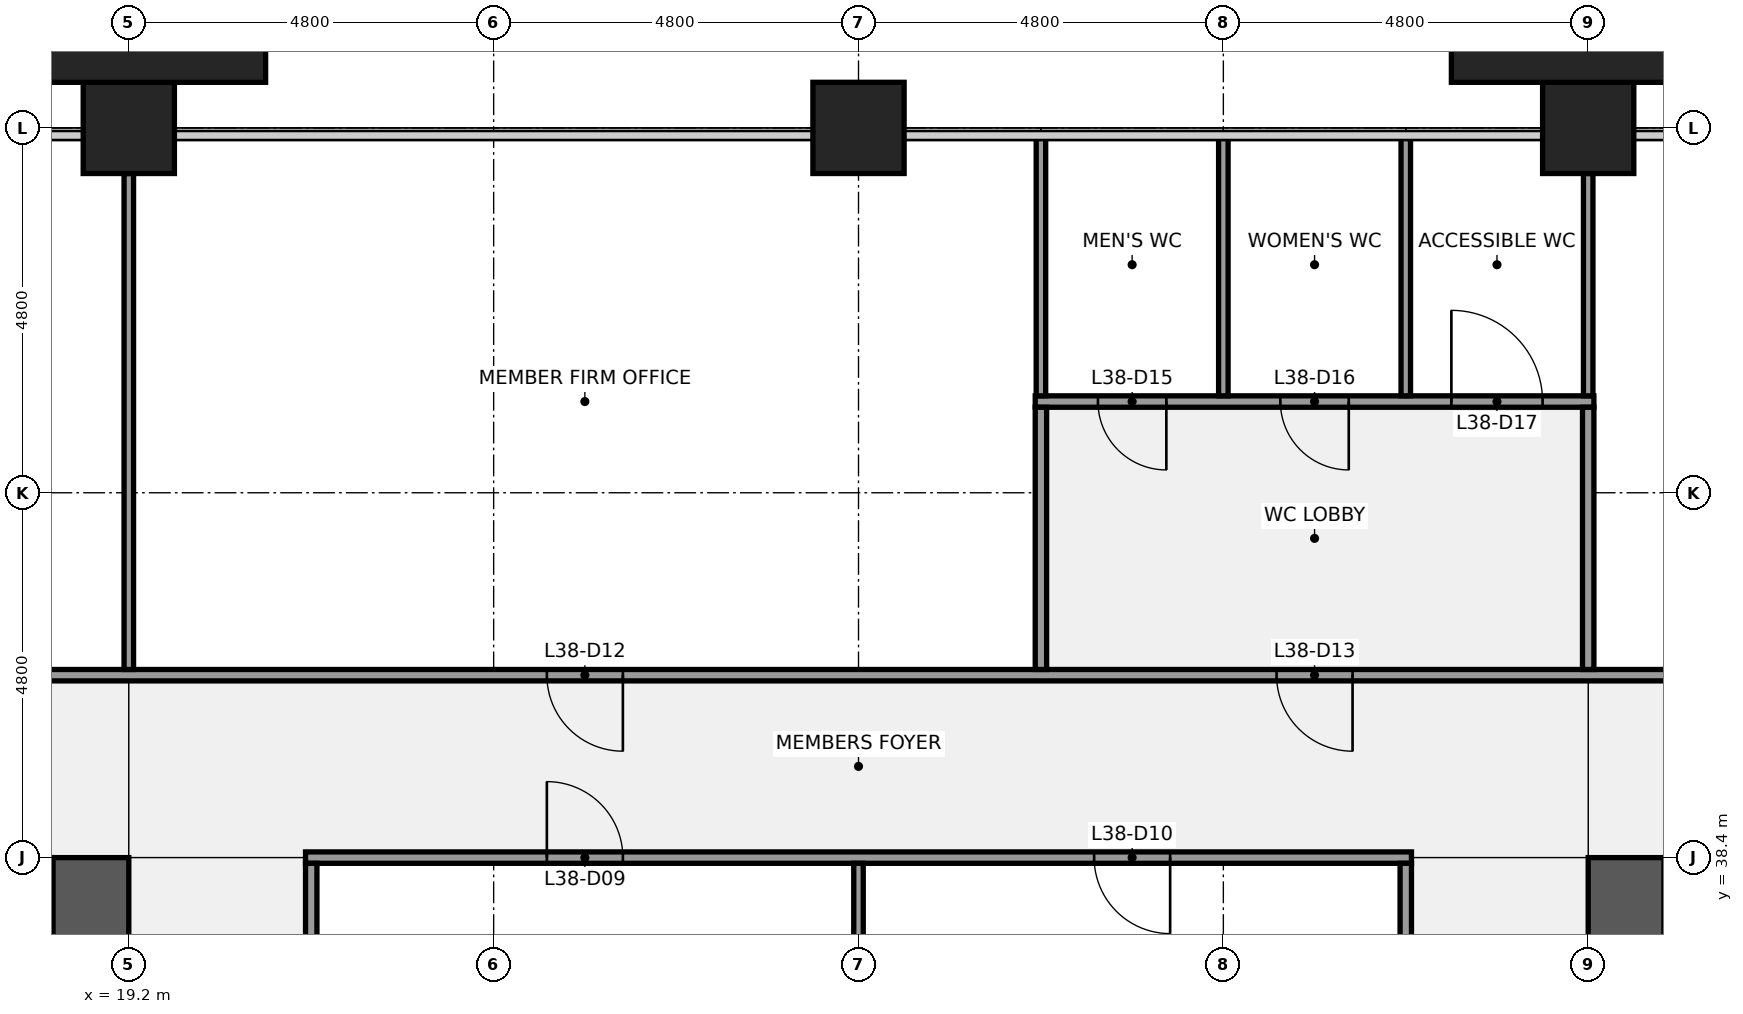
"""IFC4 building model, lengths in metres.
Left out: names, types, materials, properties, quantities, classifications, styles, units other than length and angle.
Written with IfcOpenShell. Run it as: python <this file> out.ifc"""

import sys

from ifc_helpers import new_model, si_unit, direction, frame, frame_2d, origin, origin_2d, place, context, subcontext, project, spatial, rectangle, extrude, element, fill, save


model = new_model("IFC4")
c1 = context("Model", 3, precision=1e-05, world=origin(), true_north=direction((0.0, 1.0)))
c2 = subcontext(c1, "Body", "Model", "MODEL_VIEW")
j1 = project(units=[si_unit("LENGTHUNIT", "METRE"), si_unit("PLANEANGLEUNIT", "RADIAN")], contexts=[c1])
p1 = place(None, origin())
s1 = spatial("IfcSite", under=j1, at=p1, CompositionType="ELEMENT")
p2 = place(p1, origin())
s2 = spatial("IfcBuilding", under=s1, at=p2, CompositionType="ELEMENT")
p3 = place(p2, frame((0.0, 0.0, 172.1)))
s3 = spatial("IfcBuildingStorey", under=s2, at=p3, CompositionType="ELEMENT", Elevation=172.1)
for number, where, z_axis, x_axis in (
    (1, (19.2, 48.0, 0.0), (0.0, 0.0, 1.0), (1.0, 0.0, 0.0)),
    (2, (28.8, 48.0, 0.0), (0.0, 0.0, 1.0), (1.0, 0.0, 0.0)),
    (3, (38.4, 48.0, 0.0), (0.0, 0.0, 1.0), (1.0, 0.0, 0.0)),
):
    element("IfcColumn", number, at=place(p3, frame(where, z_axis=z_axis, x_axis=x_axis)), inside=s3, PredefinedType="COLUMN", context=c2, shape_type="SweptSolid", body=[
        extrude(rectangle(XDim=1.2, YDim=1.2, at=origin_2d()), origin(), (0.0, 0.0, 1.0), 4.0),
    ])
p4 = place(p3, frame((18.7, 38.4, 0.0), z_axis=(0.0, 0.0, 1.0), x_axis=(0.0, -1.0, 0.0)))
e4 = element("IfcWall", 4, at=p4, inside=s3, PredefinedType="SHEAR", context=c2, shape_type="SweptSolid", body=[
    extrude(rectangle(XDim=28.8, YDim=1.0, at=frame_2d((14.4, 0.0))), origin(), (0.0, 0.0, 1.0), 3.7),
])
p5 = place(p4, frame((18.3, 0.0, 0.0)))
e5 = element("IfcOpeningElement", 5, at=p5, cuts=e4, PredefinedType="OPENING", context=c2, shape_type="SweptSolid", body=[
    extrude(rectangle(XDim=1.8, YDim=2.1, at=frame_2d((0.9, 1.05))), frame((0.0, 0.51, 0.0), z_axis=(0.0, -1.0, 0.0), x_axis=(1.0, 0.0, 0.0)), (0.0, 0.0, 1.0), 1.02),
])
p6 = place(p4, frame((8.7, 0.0, 0.0)))
e6 = element("IfcOpeningElement", 6, at=p6, cuts=e4, PredefinedType="OPENING", context=c2, shape_type="SweptSolid", body=[
    extrude(rectangle(XDim=1.8, YDim=2.1, at=frame_2d((0.9, 1.05))), frame((0.0, 0.51, 0.0), z_axis=(0.0, -1.0, 0.0), x_axis=(1.0, 0.0, 0.0)), (0.0, 0.0, 1.0), 1.02),
])
p7 = place(p3, frame((38.9, 9.6, 0.0), z_axis=(0.0, 0.0, 1.0), x_axis=(0.0, 1.0, 0.0)))
e7 = element("IfcWall", 7, at=p7, inside=s3, PredefinedType="SHEAR", context=c2, shape_type="SweptSolid", body=[
    extrude(rectangle(XDim=28.8, YDim=1.0, at=frame_2d((14.4, 0.0))), origin(), (0.0, 0.0, 1.0), 3.7),
])
p8 = place(p7, frame((8.7, 0.0, 0.0)))
e8 = element("IfcOpeningElement", 8, at=p8, cuts=e7, PredefinedType="OPENING", context=c2, shape_type="SweptSolid", body=[
    extrude(rectangle(XDim=1.8, YDim=2.1, at=frame_2d((0.9, 1.05))), frame((0.0, 0.51, 0.0), z_axis=(0.0, -1.0, 0.0), x_axis=(1.0, 0.0, 0.0)), (0.0, 0.0, 1.0), 1.02),
])
p9 = place(p7, frame((18.3, 0.0, 0.0)))
e9 = element("IfcOpeningElement", 9, at=p9, cuts=e7, PredefinedType="OPENING", context=c2, shape_type="SweptSolid", body=[
    extrude(rectangle(XDim=1.8, YDim=2.1, at=frame_2d((0.9, 1.05))), frame((0.0, 0.51, 0.0), z_axis=(0.0, -1.0, 0.0), x_axis=(1.0, 0.0, 0.0)), (0.0, 0.0, 1.0), 1.02),
])
p10 = place(p3, frame((21.525, 38.4, 0.0), z_axis=(0.0, 0.0, 1.0), x_axis=(1.0, 0.0, 0.0)))
e10 = element("IfcWall", 10, at=p10, inside=s3, PredefinedType="PARTITIONING", context=c2, shape_type="SweptSolid", body=[
    extrude(rectangle(XDim=14.55, YDim=0.15, at=frame_2d((7.275, 0.0))), origin(), (0.0, 0.0, 1.0), 2.709),
])
p11 = place(p10, frame((3.175, 0.0, 0.0)))
e11 = element("IfcOpeningElement", 11, at=p11, cuts=e10, PredefinedType="OPENING", context=c2, shape_type="SweptSolid", body=[
    extrude(rectangle(XDim=1.0, YDim=2.1, at=frame_2d((0.5, 1.05))), frame((0.0, 0.085, 0.0), z_axis=(0.0, -1.0, 0.0), x_axis=(1.0, 0.0, 0.0)), (0.0, 0.0, 1.0), 0.17),
])
p12 = place(p10, frame((10.375, 0.0, 0.0)))
e12 = element("IfcOpeningElement", 12, at=p12, cuts=e10, PredefinedType="OPENING", context=c2, shape_type="SweptSolid", body=[
    extrude(rectangle(XDim=1.0, YDim=2.1, at=frame_2d((0.5, 1.05))), frame((0.0, 0.085, 0.0), z_axis=(0.0, -1.0, 0.0), x_axis=(1.0, 0.0, 0.0)), (0.0, 0.0, 1.0), 0.17),
])
p13 = place(p3, frame((9.7, 40.8, 0.0), z_axis=(0.0, 0.0, 1.0), x_axis=(1.0, 0.0, 0.0)))
e13 = element("IfcWall", 13, at=p13, inside=s3, PredefinedType="PARTITIONING", context=c2, shape_type="SweptSolid", body=[
    extrude(rectangle(XDim=38.2, YDim=0.15, at=frame_2d((19.1, 0.0))), origin(), (0.0, 0.0, 1.0), 2.709),
])
p14 = place(p13, frame((4.25, 0.0, 0.0)))
e14 = element("IfcOpeningElement", 14, at=p14, cuts=e13, PredefinedType="OPENING", context=c2, shape_type="SweptSolid", body=[
    extrude(rectangle(XDim=1.0, YDim=2.1, at=frame_2d((0.5, 1.05))), frame((0.0, 0.085, 0.0), z_axis=(0.0, -1.0, 0.0), x_axis=(1.0, 0.0, 0.0)), (0.0, 0.0, 1.0), 0.17),
])
p15 = place(p13, frame((15.0, 0.0, 0.0)))
e15 = element("IfcOpeningElement", 15, at=p15, cuts=e13, PredefinedType="OPENING", context=c2, shape_type="SweptSolid", body=[
    extrude(rectangle(XDim=1.0, YDim=2.1, at=frame_2d((0.5, 1.05))), frame((0.0, 0.085, 0.0), z_axis=(0.0, -1.0, 0.0), x_axis=(1.0, 0.0, 0.0)), (0.0, 0.0, 1.0), 0.17),
])
p16 = place(p13, frame((24.6, 0.0, 0.0)))
e16 = element("IfcOpeningElement", 16, at=p16, cuts=e13, PredefinedType="OPENING", context=c2, shape_type="SweptSolid", body=[
    extrude(rectangle(XDim=1.0, YDim=2.1, at=frame_2d((0.5, 1.05))), frame((0.0, 0.085, 0.0), z_axis=(0.0, -1.0, 0.0), x_axis=(1.0, 0.0, 0.0)), (0.0, 0.0, 1.0), 0.17),
])
p17 = place(p13, frame((32.95, 0.0, 0.0)))
e17 = element("IfcOpeningElement", 17, at=p17, cuts=e13, PredefinedType="OPENING", context=c2, shape_type="SweptSolid", body=[
    extrude(rectangle(XDim=1.0, YDim=2.1, at=frame_2d((0.5, 1.05))), frame((0.0, 0.085, 0.0), z_axis=(0.0, -1.0, 0.0), x_axis=(1.0, 0.0, 0.0)), (0.0, 0.0, 1.0), 0.17),
])
p18 = place(p3, frame((31.125, 44.4, 0.0), z_axis=(0.0, 0.0, 1.0), x_axis=(1.0, 0.0, 0.0)))
e18 = element("IfcWall", 18, at=p18, inside=s3, PredefinedType="PARTITIONING", context=c2, shape_type="SweptSolid", body=[
    extrude(rectangle(XDim=7.35, YDim=0.15, at=frame_2d((3.675, 0.0))), origin(), (0.0, 0.0, 1.0), 2.709),
])
p19 = place(p18, frame((0.825, 0.0, 0.0)))
e19 = element("IfcOpeningElement", 19, at=p19, cuts=e18, PredefinedType="OPENING", context=c2, shape_type="SweptSolid", body=[
    extrude(rectangle(XDim=0.9, YDim=2.1, at=frame_2d((0.45, 1.05))), frame((0.0, 0.085, 0.0), z_axis=(0.0, -1.0, 0.0), x_axis=(1.0, 0.0, 0.0)), (0.0, 0.0, 1.0), 0.17),
])
p20 = place(p18, frame((3.225, 0.0, 0.0)))
e20 = element("IfcOpeningElement", 20, at=p20, cuts=e18, PredefinedType="OPENING", context=c2, shape_type="SweptSolid", body=[
    extrude(rectangle(XDim=0.9, YDim=2.1, at=frame_2d((0.45, 1.05))), frame((0.0, 0.085, 0.0), z_axis=(0.0, -1.0, 0.0), x_axis=(1.0, 0.0, 0.0)), (0.0, 0.0, 1.0), 0.17),
])
p21 = place(p18, frame((5.475, 0.0, 0.0)))
e21 = element("IfcOpeningElement", 21, at=p21, cuts=e18, PredefinedType="OPENING", context=c2, shape_type="SweptSolid", body=[
    extrude(rectangle(XDim=1.2, YDim=2.1, at=frame_2d((0.6, 1.05))), frame((0.0, 0.085, 0.0), z_axis=(0.0, -1.0, 0.0), x_axis=(1.0, 0.0, 0.0)), (0.0, 0.0, 1.0), 0.17),
])
p22 = place(p3, frame((19.2, 40.875, 0.0), z_axis=(0.0, 0.0, 1.0), x_axis=(0.0, 1.0, 0.0)))
e22 = element("IfcWall", 22, at=p22, inside=s3, PredefinedType="PARTITIONING", context=c2, shape_type="SweptSolid", body=[
    extrude(rectangle(XDim=6.525, YDim=0.125, at=frame_2d((3.262, 0.0))), origin(), (0.0, 0.0, 1.0), 2.709),
])
p23 = place(p3, frame((21.6, 33.675, 0.0), z_axis=(0.0, 0.0, 1.0), x_axis=(0.0, 1.0, 0.0)))
e23 = element("IfcWall", 23, at=p23, inside=s3, PredefinedType="PARTITIONING", context=c2, shape_type="SweptSolid", body=[
    extrude(rectangle(XDim=4.65, YDim=0.15, at=frame_2d((2.325, 0.0))), origin(), (0.0, 0.0, 1.0), 2.709),
])
p24 = place(p3, frame((28.8, 33.663, 0.0), z_axis=(0.0, 0.0, 1.0), x_axis=(0.0, 1.0, 0.0)))
e24 = element("IfcWall", 24, at=p24, inside=s3, PredefinedType="PARTITIONING", context=c2, shape_type="SweptSolid", body=[
    extrude(rectangle(XDim=4.662, YDim=0.125, at=frame_2d((2.331, 0.0))), origin(), (0.0, 0.0, 1.0), 2.709),
])
p25 = place(p3, frame((31.2, 44.475, 0.0), z_axis=(0.0, 0.0, 1.0), x_axis=(0.0, 1.0, 0.0)))
e25 = element("IfcWall", 25, at=p25, inside=s3, PredefinedType="PARTITIONING", context=c2, shape_type="SweptSolid", body=[
    extrude(rectangle(XDim=3.425, YDim=0.125, at=frame_2d((1.712, 0.0))), origin(), (0.0, 0.0, 1.0), 2.709),
])
p26 = place(p3, frame((31.2, 40.875, 0.0), z_axis=(0.0, 0.0, 1.0), x_axis=(0.0, 1.0, 0.0)))
e26 = element("IfcWall", 26, at=p26, inside=s3, PredefinedType="PARTITIONING", context=c2, shape_type="SweptSolid", body=[
    extrude(rectangle(XDim=3.45, YDim=0.15, at=frame_2d((1.725, 0.0))), origin(), (0.0, 0.0, 1.0), 2.709),
])
for number, where, z_axis, x_axis in (
    (27, (33.6, 44.475, 0.0), (0.0, 0.0, 1.0), (0.0, 1.0, 0.0)),
    (28, (36.0, 44.475, 0.0), (0.0, 0.0, 1.0), (0.0, 1.0, 0.0)),
):
    element("IfcWall", number, at=place(p3, frame(where, z_axis=z_axis, x_axis=x_axis)), inside=s3, PredefinedType="PARTITIONING", context=c2, shape_type="SweptSolid", body=[
        extrude(rectangle(XDim=3.425, YDim=0.125, at=frame_2d((1.712, 0.0))), origin(), (0.0, 0.0, 1.0), 2.709),
    ])
p27 = place(p3, frame((36.0, 33.675, 0.0), z_axis=(0.0, 0.0, 1.0), x_axis=(0.0, 1.0, 0.0)))
e29 = element("IfcWall", 29, at=p27, inside=s3, PredefinedType="PARTITIONING", context=c2, shape_type="SweptSolid", body=[
    extrude(rectangle(XDim=4.65, YDim=0.15, at=frame_2d((2.325, 0.0))), origin(), (0.0, 0.0, 1.0), 2.709),
])
p28 = place(p3, frame((38.4, 44.475, 0.0), z_axis=(0.0, 0.0, 1.0), x_axis=(0.0, 1.0, 0.0)))
e30 = element("IfcWall", 30, at=p28, inside=s3, PredefinedType="PARTITIONING", context=c2, shape_type="SweptSolid", body=[
    extrude(rectangle(XDim=2.925, YDim=0.125, at=frame_2d((1.462, 0.0))), origin(), (0.0, 0.0, 1.0), 2.709),
])
p29 = place(p3, frame((38.4, 40.875, 0.0), z_axis=(0.0, 0.0, 1.0), x_axis=(0.0, 1.0, 0.0)))
e31 = element("IfcWall", 31, at=p29, inside=s3, PredefinedType="PARTITIONING", context=c2, shape_type="SweptSolid", body=[
    extrude(rectangle(XDim=3.45, YDim=0.15, at=frame_2d((1.725, 0.0))), origin(), (0.0, 0.0, 1.0), 2.709),
])
for number, where, z_axis, x_axis in (
    (32, (19.2, 49.05, 0.0), (0.0, 0.0, 1.0), (1.0, 0.0, 0.0)),
    (33, (38.4, 49.05, 0.0), (0.0, 0.0, 1.0), (1.0, 0.0, 0.0)),
):
    element("IfcColumn", number, at=place(p3, frame(where, z_axis=z_axis, x_axis=x_axis)), inside=s3, PredefinedType="PILASTER", context=c2, shape_type="SweptSolid", body=[
        extrude(rectangle(XDim=3.6, YDim=0.9, at=origin_2d()), origin(), (0.0, 0.0, 1.0), 4.0),
    ])
p30 = place(p11, origin())
e34 = element("IfcDoor", 34, at=p30, inside=s3, OperationType="SINGLE_SWING_LEFT", PredefinedType="DOOR", context=c2, shape_type="SweptSolid", body=[
    extrude(rectangle(XDim=1.0, YDim=2.1, at=frame_2d((0.5, 1.05))), frame((0.0, 0.025, 0.0), z_axis=(0.0, -1.0, 0.0), x_axis=(1.0, 0.0, 0.0)), (0.0, 0.0, 1.0), 0.05),
])
fill(e11, e34)
p31 = place(p12, origin())
e35 = element("IfcDoor", 35, at=p31, inside=s3, OperationType="SINGLE_SWING_RIGHT", PredefinedType="DOOR", context=c2, shape_type="SweptSolid", body=[
    extrude(rectangle(XDim=1.0, YDim=2.1, at=frame_2d((0.5, 1.05))), frame((0.0, 0.025, 0.0), z_axis=(0.0, -1.0, 0.0), x_axis=(1.0, 0.0, 0.0)), (0.0, 0.0, 1.0), 0.05),
])
fill(e12, e35)
p32 = place(p15, origin())
e36 = element("IfcDoor", 36, at=p32, inside=s3, OperationType="SINGLE_SWING_RIGHT", PredefinedType="DOOR", context=c2, shape_type="SweptSolid", body=[
    extrude(rectangle(XDim=1.0, YDim=2.1, at=frame_2d((0.5, 1.05))), frame((0.0, 0.025, 0.0), z_axis=(0.0, -1.0, 0.0), x_axis=(1.0, 0.0, 0.0)), (0.0, 0.0, 1.0), 0.05),
])
fill(e15, e36)
p33 = place(p16, origin())
e37 = element("IfcDoor", 37, at=p33, inside=s3, OperationType="SINGLE_SWING_RIGHT", PredefinedType="DOOR", context=c2, shape_type="SweptSolid", body=[
    extrude(rectangle(XDim=1.0, YDim=2.1, at=frame_2d((0.5, 1.05))), frame((0.0, 0.025, 0.0), z_axis=(0.0, -1.0, 0.0), x_axis=(1.0, 0.0, 0.0)), (0.0, 0.0, 1.0), 0.05),
])
fill(e16, e37)
p34 = place(p19, origin())
e38 = element("IfcDoor", 38, at=p34, inside=s3, OperationType="SINGLE_SWING_RIGHT", PredefinedType="DOOR", context=c2, shape_type="SweptSolid", body=[
    extrude(rectangle(XDim=0.9, YDim=2.1, at=frame_2d((0.45, 1.05))), frame((0.0, 0.025, 0.0), z_axis=(0.0, -1.0, 0.0), x_axis=(1.0, 0.0, 0.0)), (0.0, 0.0, 1.0), 0.05),
])
fill(e19, e38)
p35 = place(p20, origin())
e39 = element("IfcDoor", 39, at=p35, inside=s3, OperationType="SINGLE_SWING_RIGHT", PredefinedType="DOOR", context=c2, shape_type="SweptSolid", body=[
    extrude(rectangle(XDim=0.9, YDim=2.1, at=frame_2d((0.45, 1.05))), frame((0.0, 0.025, 0.0), z_axis=(0.0, -1.0, 0.0), x_axis=(1.0, 0.0, 0.0)), (0.0, 0.0, 1.0), 0.05),
])
fill(e20, e39)
p36 = place(p21, origin())
e40 = element("IfcDoor", 40, at=p36, inside=s3, OperationType="SINGLE_SWING_LEFT", PredefinedType="DOOR", context=c2, shape_type="SweptSolid", body=[
    extrude(rectangle(XDim=1.2, YDim=2.1, at=frame_2d((0.6, 1.05))), frame((0.0, 0.025, 0.0), z_axis=(0.0, -1.0, 0.0), x_axis=(1.0, 0.0, 0.0)), (0.0, 0.0, 1.0), 0.05),
])
fill(e21, e40)
save(model, sys.argv[1])
